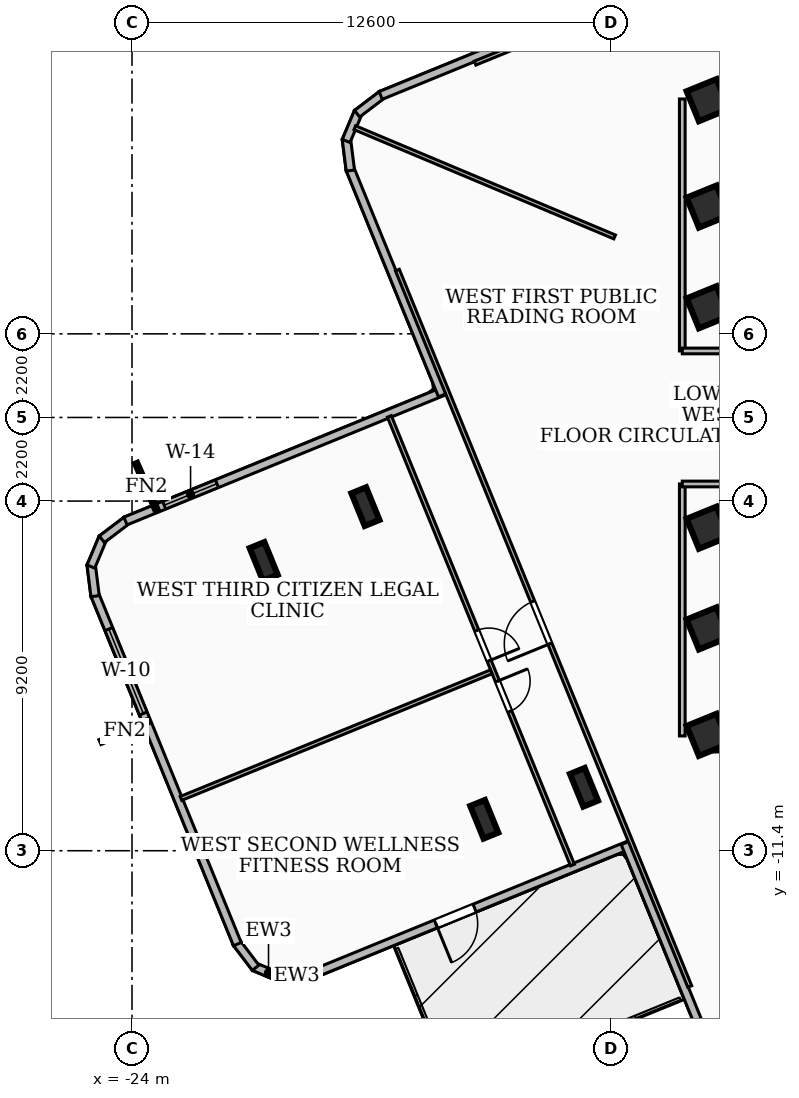
"""IFC4 building model, lengths in metres.
Left out: names, types, materials, properties, quantities, classifications, styles, units other than length and angle.
Written with IfcOpenShell. Run it as: python <this file> out.ifc"""

import sys

from ifc_helpers import new_model, si_unit, direction, frame, frame_2d, origin, origin_2d, place, context, subcontext, project, spatial, rectangle, i_section, extrude, element, fill, save


model = new_model("IFC4")
c1 = context("Model", 3, precision=1e-05, world=origin(), true_north=direction((0.0, 1.0)))
c2 = subcontext(c1, "Body", "Model", "MODEL_VIEW")
j1 = project(units=[si_unit("LENGTHUNIT", "METRE"), si_unit("PLANEANGLEUNIT", "RADIAN")], contexts=[c1])
p1 = place(None, origin())
s1 = spatial("IfcSite", under=j1, at=p1, CompositionType="ELEMENT")
p2 = place(p1, origin())
s2 = spatial("IfcBuilding", under=s1, at=p2, CompositionType="ELEMENT")
p3 = place(p2, frame((0.0, 0.0, 173.88)))
s3 = spatial("IfcBuildingStorey", under=s2, at=p3, CompositionType="ELEMENT", Elevation=173.88)
for number, where, z_axis, x_axis in (
    (1, (-8.78, 8.535, 0.0), (0.0, 0.0, 1.0), (1.0, 0.0, 0.0)),
    (2, (8.78, -8.535, 0.0), (0.0, 0.0, 1.0), (-1.0, 0.0, 0.0)),
):
    element("IfcWall", number, at=place(p3, frame(where, z_axis=z_axis, x_axis=x_axis)), inside=s3, PredefinedType="SHEAR", context=c2, shape_type="SweptSolid", body=[
        extrude(rectangle(XDim=17.56, YDim=0.45, at=frame_2d((8.78, 0.0))), origin(), (0.0, 0.0, 1.0), 3.34),
    ])
for number, where, z_axis, x_axis in (
    (3, (-8.85, -5.55, 0.0), (0.0, 0.0, 1.0), (0.926, 0.378, 0.0)),
    (4, (-8.85, -2.9, 0.0), (0.0, 0.0, 1.0), (0.926, 0.378, 0.0)),
    (5, (-8.85, 2.9, 0.0), (0.0, 0.0, 1.0), (0.926, 0.378, 0.0)),
    (6, (-8.85, 5.55, 0.0), (0.0, 0.0, 1.0), (0.926, 0.378, 0.0)),
    (7, (-8.85, 8.35, 0.0), (0.0, 0.0, 1.0), (0.926, 0.378, 0.0)),
    (8, (-8.85, -8.35, 0.0), (0.0, 0.0, 1.0), (0.926, 0.378, 0.0)),
):
    element("IfcColumn", number, at=place(p3, frame(where, z_axis=z_axis, x_axis=x_axis)), inside=s3, PredefinedType="COLUMN", context=c2, shape_type="SweptSolid", body=[
        extrude(rectangle(XDim=0.85, YDim=0.85, at=origin_2d()), origin(), (0.0, 0.0, 1.0), 3.6),
    ])
for number, where, z_axis, x_axis in (
    (9, (-17.858, -2.346, 0.0), (0.0, 0.0, 1.0), (0.926, 0.378, 0.0)),
    (10, (-12.106, -9.731, 0.0), (0.0, 0.0, 1.0), (0.926, 0.378, 0.0)),
    (11, (-20.535, -3.788, 0.0), (0.0, 0.0, 1.0), (0.926, 0.378, 0.0)),
    (12, (-14.731, -10.573, 0.0), (0.0, 0.0, 1.0), (0.926, 0.378, 0.0)),
):
    element("IfcColumn", number, at=place(p3, frame(where, z_axis=z_axis, x_axis=x_axis)), inside=s3, PredefinedType="COLUMN", context=c2, shape_type="SweptSolid", body=[
        extrude(i_section(OverallWidth=0.418, OverallDepth=0.927, WebThickness=0.019, FlangeThickness=0.032, at=origin_2d()), origin(), (0.0, 0.0, 1.0), 3.6),
    ])
p4 = place(p3, frame((-10.912, -11.246, 0.0), z_axis=(0.0, 0.0, 1.0), x_axis=(-0.925847643695, -0.377896997427, 0.0)))
e13 = element("IfcWall", 13, at=p4, inside=s3, PredefinedType="SOLIDWALL", context=c2, shape_type="SweptSolid", body=[
    extrude(rectangle(XDim=9.058, YDim=0.22, at=frame_2d((4.529, 0.0))), origin(), (0.0, 0.0, 1.0), 2.72),
])
p5 = place(p4, frame((4.4, 0.0, 0.0)))
e14 = element("IfcOpeningElement", 14, at=p5, cuts=e13, PredefinedType="OPENING", context=c2, shape_type="SweptSolid", body=[
    extrude(rectangle(XDim=1.1, YDim=2.1, at=frame_2d((0.55, 1.05))), frame((0.0, 0.12, 0.0), z_axis=(0.0, -1.0, 0.0), x_axis=(1.0, 0.0, 0.0)), (0.0, 0.0, 1.0), 0.24),
])
p6 = place(p3, frame((-19.25, -14.657, 0.0), z_axis=(0.0, 0.0, 1.0), x_axis=(-0.992201162123, -0.124646916858, 0.0)))
e15 = element("IfcWall", 15, at=p6, inside=s3, PredefinedType="SOLIDWALL", context=c2, shape_type="SweptSolid", body=[
    extrude(rectangle(XDim=0.834, YDim=0.22, at=frame_2d((0.417, 0.0))), origin(), (0.0, 0.0, 1.0), 3.34),
])
p7 = place(p3, frame((-20.03, -14.768, 0.0), z_axis=(0.0, 0.0, 1.0), x_axis=(-0.921697006113, 0.387910593981, 0.0)))
e16 = element("IfcWall", 16, at=p7, inside=s3, PredefinedType="SOLIDWALL", context=c2, shape_type="SweptSolid", body=[
    extrude(rectangle(XDim=0.82, YDim=0.22, at=frame_2d((0.41, 0.0))), origin(), (0.0, 0.0, 1.0), 3.34),
])
p8 = place(p3, frame((-20.748, -14.48, 0.0), z_axis=(0.0, 0.0, 1.0), x_axis=(-0.603925287566, 0.797040931846, 0.0)))
e17 = element("IfcWall", 17, at=p8, inside=s3, PredefinedType="SOLIDWALL", context=c2, shape_type="SweptSolid", body=[
    extrude(rectangle(XDim=0.834, YDim=0.22, at=frame_2d((0.417, 0.0))), origin(), (0.0, 0.0, 1.0), 3.34),
])
p9 = place(p3, frame((-21.228, -13.858, 0.0), z_axis=(0.0, 0.0, 1.0), x_axis=(-0.377742315497, 0.925910764104, 0.0)))
e18 = element("IfcWall", 18, at=p9, inside=s3, PredefinedType="SOLIDWALL", context=c2, shape_type="SweptSolid", body=[
    extrude(rectangle(XDim=9.94, YDim=0.22, at=frame_2d((4.97, 0.0))), origin(), (0.0, 0.0, 1.0), 3.34),
])
p10 = place(p9, frame((6.554, 0.0, 0.85)))
e19 = element("IfcOpeningElement", 19, at=p10, cuts=e18, PredefinedType="OPENING", context=c2, shape_type="SweptSolid", body=[
    extrude(rectangle(XDim=2.4, YDim=1.65, at=frame_2d((1.2, 0.825))), frame((0.0, 0.12, 0.0), z_axis=(0.0, -1.0, 0.0), x_axis=(1.0, 0.0, 0.0)), (0.0, 0.0, 1.0), 0.24),
])
p11 = place(p3, frame((-24.971, -4.702, 0.0), z_axis=(0.0, 0.0, 1.0), x_axis=(-0.124646916858, 0.992201162123, 0.0)))
e20 = element("IfcWall", 20, at=p11, inside=s3, PredefinedType="SOLIDWALL", context=c2, shape_type="SweptSolid", body=[
    extrude(rectangle(XDim=0.834, YDim=0.22, at=frame_2d((0.417, 0.0))), origin(), (0.0, 0.0, 1.0), 3.34),
])
p12 = place(p3, frame((-25.082, -3.922, 0.0), z_axis=(0.0, 0.0, 1.0), x_axis=(0.38823015532, 0.921562448508, 0.0)))
e21 = element("IfcWall", 21, at=p12, inside=s3, PredefinedType="SOLIDWALL", context=c2, shape_type="SweptSolid", body=[
    extrude(rectangle(XDim=0.819, YDim=0.22, at=frame_2d((0.41, 0.0))), origin(), (0.0, 0.0, 1.0), 3.34),
])
p13 = place(p3, frame((-24.794, -3.205, 0.0), z_axis=(0.0, 0.0, 1.0), x_axis=(0.796900091387, 0.604111119205, 0.0)))
e22 = element("IfcWall", 22, at=p13, inside=s3, PredefinedType="SOLIDWALL", context=c2, shape_type="SweptSolid", body=[
    extrude(rectangle(XDim=0.834, YDim=0.22, at=frame_2d((0.417, 0.0))), origin(), (0.0, 0.0, 1.0), 3.34),
])
p14 = place(p3, frame((-24.172, -2.725, 0.0), z_axis=(0.0, 0.0, 1.0), x_axis=(0.925879781482, 0.377818250278, 0.0)))
e23 = element("IfcWall", 23, at=p14, inside=s3, PredefinedType="SOLIDWALL", context=c2, shape_type="SweptSolid", body=[
    extrude(rectangle(XDim=9.058, YDim=0.22, at=frame_2d((4.529, 0.0))), origin(), (0.0, 0.0, 1.0), 3.34),
])
p15 = place(p14, frame((1.1, 0.0, 0.85)))
e24 = element("IfcOpeningElement", 24, at=p15, cuts=e23, PredefinedType="OPENING", context=c2, shape_type="SweptSolid", body=[
    extrude(rectangle(XDim=1.5, YDim=1.5, at=frame_2d((0.75, 0.75))), frame((0.0, 0.12, 0.0), z_axis=(0.0, -1.0, 0.0), x_axis=(1.0, 0.0, 0.0)), (0.0, 0.0, 1.0), 0.24),
])
p16 = place(p3, frame((-15.834, 0.583, 0.0), z_axis=(0.0, 0.0, 1.0), x_axis=(-0.377776256629, 0.925896916469, 0.0)))
e25 = element("IfcWall", 25, at=p16, inside=s3, PredefinedType="SOLIDWALL", context=c2, shape_type="SweptSolid", body=[
    extrude(rectangle(XDim=6.438, YDim=0.22, at=frame_2d((3.219, 0.0))), origin(), (0.0, 0.0, 1.0), 3.34),
])
p17 = place(p3, frame((-18.254, 6.496, 0.0), z_axis=(0.0, 0.0, 1.0), x_axis=(-0.124646916858, 0.992201162123, 0.0)))
e26 = element("IfcWall", 26, at=p17, inside=s3, PredefinedType="SOLIDWALL", context=c2, shape_type="SweptSolid", body=[
    extrude(rectangle(XDim=0.834, YDim=0.22, at=frame_2d((0.417, 0.0))), origin(), (0.0, 0.0, 1.0), 3.34),
])
p18 = place(p3, frame((-18.365, 7.276, 0.0), z_axis=(0.0, 0.0, 1.0), x_axis=(0.387977068381, 0.9216690265, 0.0)))
e27 = element("IfcWall", 27, at=p18, inside=s3, PredefinedType="SOLIDWALL", context=c2, shape_type="SweptSolid", body=[
    extrude(rectangle(XDim=0.819, YDim=0.22, at=frame_2d((0.41, 0.0))), origin(), (0.0, 0.0, 1.0), 3.34),
])
p19 = place(p3, frame((-18.077, 7.993, 0.0), z_axis=(0.0, 0.0, 1.0), x_axis=(0.796365329878, 0.604815890473, 0.0)))
e28 = element("IfcWall", 28, at=p19, inside=s3, PredefinedType="SOLIDWALL", context=c2, shape_type="SweptSolid", body=[
    extrude(rectangle(XDim=0.833, YDim=0.22, at=frame_2d((0.417, 0.0))), origin(), (0.0, 0.0, 1.0), 3.34),
])
p20 = place(p3, frame((-17.456, 8.473, 0.0), z_axis=(0.0, 0.0, 1.0), x_axis=(0.925916493636, 0.377728271133, 0.0)))
e29 = element("IfcWall", 29, at=p20, inside=s3, PredefinedType="SOLIDWALL", context=c2, shape_type="SweptSolid", body=[
    extrude(rectangle(XDim=6.759, YDim=0.22, at=frame_2d((3.379, 0.0))), origin(), (0.0, 0.0, 1.0), 3.34),
])
p21 = place(p3, frame((-8.473, -17.456, 0.0), z_axis=(0.0, 0.0, 1.0), x_axis=(-0.377728271133, 0.925916493636, 0.0)))
e30 = element("IfcWall", 30, at=p21, inside=s3, PredefinedType="SOLIDWALL", context=c2, shape_type="SweptSolid", body=[
    extrude(rectangle(XDim=6.759, YDim=0.22, at=frame_2d((3.379, 0.0))), origin(), (0.0, 0.0, 1.0), 2.72),
])
p22 = place(p3, frame((-9.52, 1.75, 0.0), z_axis=(0.0, 0.0, 1.0), x_axis=(0.0, 1.0, 0.0)))
e31 = element("IfcWall", 31, at=p22, inside=s3, PredefinedType="PARTITIONING", context=c2, shape_type="SweptSolid", body=[
    extrude(rectangle(XDim=6.63, YDim=0.15, at=frame_2d((3.315, 0.0))), origin(), (0.0, 0.0, 1.0), 3.34),
])
p23 = place(p3, frame((-7.85, 1.75, 0.0), z_axis=(0.0, 0.0, 1.0), x_axis=(-1.0, 0.0, 0.0)))
e32 = element("IfcWall", 32, at=p23, inside=s3, PredefinedType="PARTITIONING", context=c2, shape_type="SweptSolid", body=[
    extrude(rectangle(XDim=1.67, YDim=0.15, at=frame_2d((0.835, 0.0))), origin(), (0.0, 0.0, 1.0), 2.57),
])
p24 = place(p3, frame((-9.52, -8.38, 0.0), z_axis=(0.0, 0.0, 1.0), x_axis=(0.0, 1.0, 0.0)))
e33 = element("IfcWall", 33, at=p24, inside=s3, PredefinedType="PARTITIONING", context=c2, shape_type="SweptSolid", body=[
    extrude(rectangle(XDim=6.63, YDim=0.15, at=frame_2d((3.315, 0.0))), origin(), (0.0, 0.0, 1.0), 2.644),
])
p25 = place(p3, frame((-7.85, -1.75, 0.0), z_axis=(0.0, 0.0, 1.0), x_axis=(-1.0, 0.0, 0.0)))
e34 = element("IfcWall", 34, at=p25, inside=s3, PredefinedType="PARTITIONING", context=c2, shape_type="SweptSolid", body=[
    extrude(rectangle(XDim=1.67, YDim=0.15, at=frame_2d((0.835, 0.0))), origin(), (0.0, 0.0, 1.0), 2.57),
])
p26 = place(p3, frame((-11.3, 4.75, 0.0), z_axis=(0.0, 0.0, 1.0), x_axis=(-0.92186077199, 0.387521247245, 0.0)))
e35 = element("IfcWall", 35, at=p26, inside=s3, PredefinedType="PARTITIONING", context=c2, shape_type="SweptSolid", body=[
    extrude(rectangle(XDim=7.417, YDim=0.11, at=frame_2d((3.708, 0.0))), origin(), (0.0, 0.0, 1.0), 3.34),
])
p27 = place(p3, frame((-14.973, 9.323, 0.0), z_axis=(0.0, 0.0, 1.0), x_axis=(0.92584978414, 0.377891753295, 0.0)))
e36 = element("IfcWall", 36, at=p27, inside=s3, PredefinedType="PARTITIONING", context=c2, shape_type="SweptSolid", body=[
    extrude(rectangle(XDim=20.361, YDim=0.11, at=frame_2d((10.18, 0.0))), origin(), (0.0, 0.0, 1.0), 2.644),
])
p28 = place(p27, frame((9.741, 0.0, 0.0)))
e37 = element("IfcOpeningElement", 37, at=p28, cuts=e36, PredefinedType="OPENING", context=c2, shape_type="SweptSolid", body=[
    extrude(rectangle(XDim=1.2, YDim=2.1, at=frame_2d((0.6, 1.05))), frame((0.0, 0.065, 0.0), z_axis=(0.0, -1.0, 0.0), x_axis=(1.0, 0.0, 0.0)), (0.0, 0.0, 1.0), 0.13),
])
p29 = place(p3, frame((-9.323, -14.973, 0.0), z_axis=(0.0, 0.0, 1.0), x_axis=(-0.377891753295, 0.92584978414, 0.0)))
e38 = element("IfcWall", 38, at=p29, inside=s3, PredefinedType="PARTITIONING", context=c2, shape_type="SweptSolid", body=[
    extrude(rectangle(XDim=20.361, YDim=0.11, at=frame_2d((10.18, 0.0))), origin(), (0.0, 0.0, 1.0), 2.644),
])
p30 = place(p29, frame((9.741, 0.0, 0.0)))
e39 = element("IfcOpeningElement", 39, at=p30, cuts=e38, PredefinedType="OPENING", context=c2, shape_type="SweptSolid", body=[
    extrude(rectangle(XDim=1.2, YDim=2.1, at=frame_2d((0.6, 1.05))), frame((0.0, 0.065, 0.0), z_axis=(0.0, -1.0, 0.0), x_axis=(1.0, 0.0, 0.0)), (0.0, 0.0, 1.0), 0.13),
])
p31 = place(p3, frame((-14.549, -6.694, 0.0), z_axis=(0.0, 0.0, 1.0), x_axis=(-0.925908739044, -0.377747279226, 0.0)))
e40 = element("IfcWall", 40, at=p31, inside=s3, PredefinedType="PARTITIONING", context=c2, shape_type="SweptSolid", body=[
    extrude(rectangle(XDim=8.815, YDim=0.11, at=frame_2d((4.407, 0.0))), origin(), (0.0, 0.0, 1.0), 3.34),
])
p32 = place(p3, frame((-17.228, 0.028, 0.0), z_axis=(0.0, 0.0, 1.0), x_axis=(0.377875224856, -0.92585653016, 0.0)))
e41 = element("IfcWall", 41, at=p32, inside=s3, PredefinedType="PARTITIONING", context=c2, shape_type="SweptSolid", body=[
    extrude(rectangle(XDim=12.75, YDim=0.11, at=frame_2d((6.375, 0.0))), origin(), (0.0, 0.0, 1.0), 2.644),
])
p33 = place(p32, frame((6.085, 0.0, 0.0)))
e42 = element("IfcOpeningElement", 42, at=p33, cuts=e41, PredefinedType="OPENING", context=c2, shape_type="SweptSolid", body=[
    extrude(rectangle(XDim=0.86, YDim=2.04, at=frame_2d((0.43, 1.02))), frame((0.0, 0.065, 0.0), z_axis=(0.0, -1.0, 0.0), x_axis=(1.0, 0.0, 0.0)), (0.0, 0.0, 1.0), 0.13),
])
p34 = place(p32, frame((7.525, 0.0, 0.0)))
e43 = element("IfcOpeningElement", 43, at=p34, cuts=e41, PredefinedType="OPENING", context=c2, shape_type="SweptSolid", body=[
    extrude(rectangle(XDim=0.86, YDim=2.04, at=frame_2d((0.43, 1.02))), frame((0.0, 0.065, 0.0), z_axis=(0.0, -1.0, 0.0), x_axis=(1.0, 0.0, 0.0)), (0.0, 0.0, 1.0), 0.13),
])
p35 = place(p5, origin())
e44 = element("IfcDoor", 44, at=p35, inside=s3, OperationType="SINGLE_SWING_RIGHT", PredefinedType="DOOR", context=c2, shape_type="SweptSolid", body=[
    extrude(rectangle(XDim=1.1, YDim=2.1, at=frame_2d((0.55, 1.05))), frame((0.0, 0.025, 0.0), z_axis=(0.0, -1.0, 0.0), x_axis=(1.0, 0.0, 0.0)), (0.0, 0.0, 1.0), 0.05),
])
fill(e14, e44)
p36 = place(p10, origin())
e45 = element("IfcWindow", 45, at=p36, inside=s3, PartitioningType="SINGLE_PANEL", PredefinedType="WINDOW", context=c2, shape_type="SweptSolid", body=[
    extrude(rectangle(XDim=2.4, YDim=1.65, at=frame_2d((1.2, 0.825))), frame((0.0, 0.03, 0.0), z_axis=(0.0, -1.0, 0.0), x_axis=(1.0, 0.0, 0.0)), (0.0, 0.0, 1.0), 0.06),
])
fill(e19, e45)
p37 = place(p15, origin())
e46 = element("IfcWindow", 46, at=p37, inside=s3, PartitioningType="SINGLE_PANEL", PredefinedType="WINDOW", context=c2, shape_type="SweptSolid", body=[
    extrude(rectangle(XDim=1.5, YDim=1.5, at=frame_2d((0.75, 0.75))), frame((0.0, 0.03, 0.0), z_axis=(0.0, -1.0, 0.0), x_axis=(1.0, 0.0, 0.0)), (0.0, 0.0, 1.0), 0.06),
])
fill(e24, e46)
p38 = place(p30, origin())
e47 = element("IfcDoor", 47, at=p38, inside=s3, OperationType="SINGLE_SWING_LEFT", PredefinedType="DOOR", context=c2, shape_type="SweptSolid", body=[
    extrude(rectangle(XDim=1.2, YDim=2.1, at=frame_2d((0.6, 1.05))), frame((0.0, 0.025, 0.0), z_axis=(0.0, -1.0, 0.0), x_axis=(1.0, 0.0, 0.0)), (0.0, 0.0, 1.0), 0.05),
])
fill(e39, e47)
p39 = place(p33, origin())
e48 = element("IfcDoor", 48, at=p39, inside=s3, OperationType="SINGLE_SWING_RIGHT", PredefinedType="DOOR", context=c2, shape_type="SweptSolid", body=[
    extrude(rectangle(XDim=0.86, YDim=2.04, at=frame_2d((0.43, 1.02))), frame((0.0, 0.025, 0.0), z_axis=(0.0, -1.0, 0.0), x_axis=(1.0, 0.0, 0.0)), (0.0, 0.0, 1.0), 0.05),
])
fill(e42, e48)
p40 = place(p34, origin())
e49 = element("IfcDoor", 49, at=p40, inside=s3, OperationType="SINGLE_SWING_LEFT", PredefinedType="DOOR", context=c2, shape_type="SweptSolid", body=[
    extrude(rectangle(XDim=0.86, YDim=2.04, at=frame_2d((0.43, 1.02))), frame((0.0, 0.025, 0.0), z_axis=(0.0, -1.0, 0.0), x_axis=(1.0, 0.0, 0.0)), (0.0, 0.0, 1.0), 0.05),
])
fill(e43, e49)
save(model, sys.argv[1])
